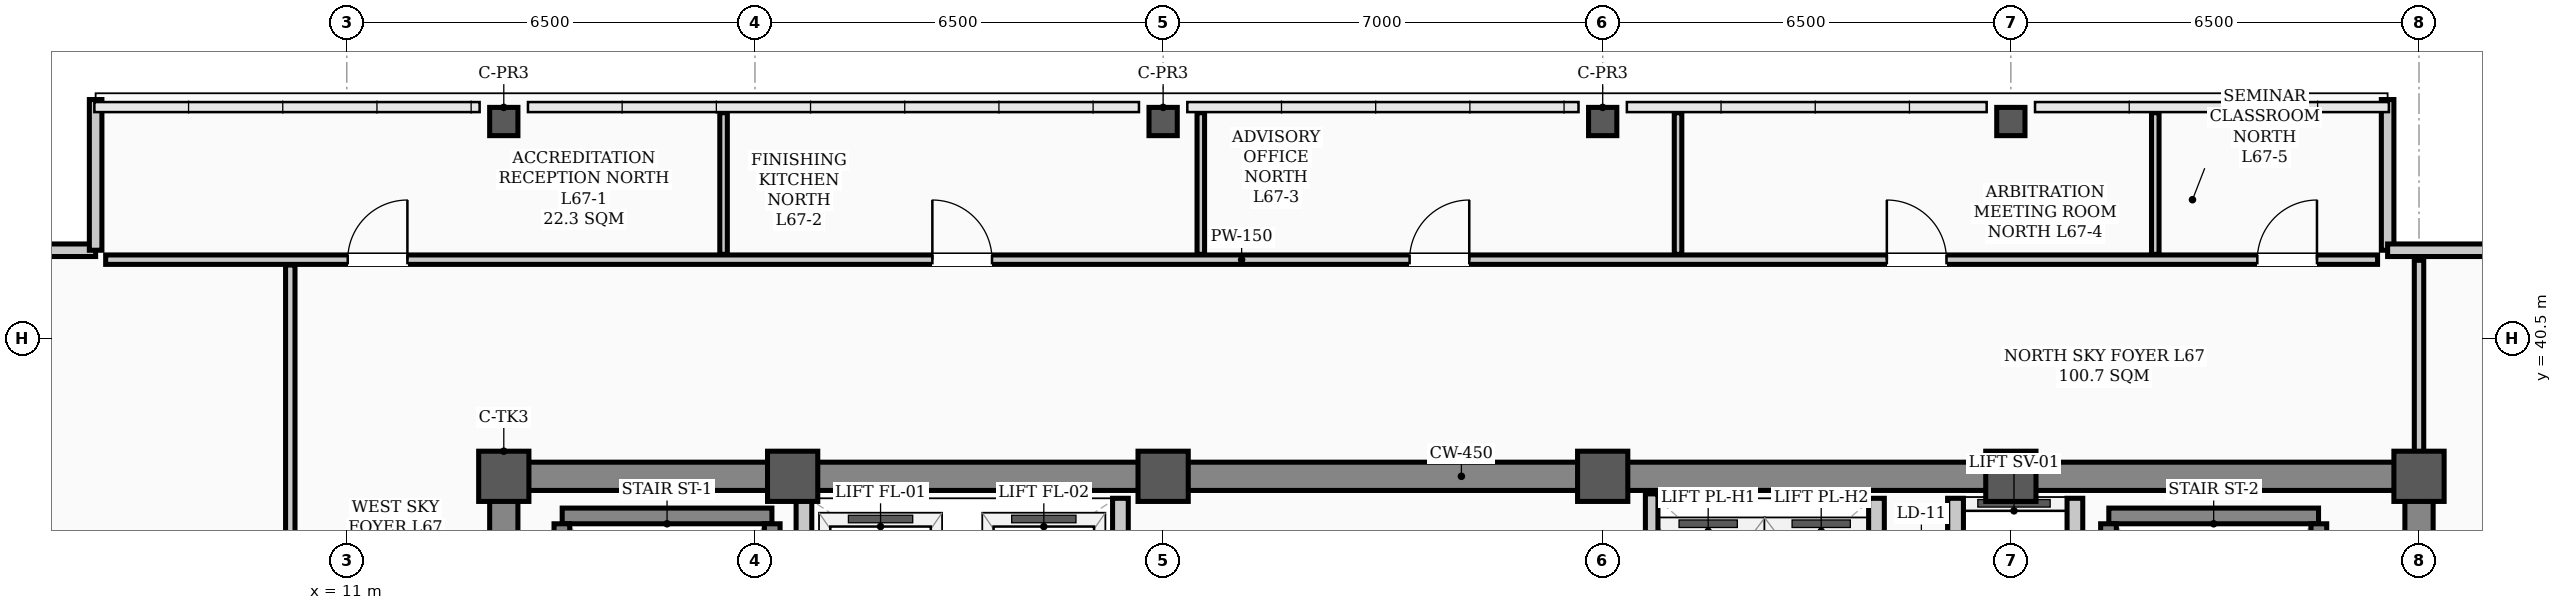
"""IFC4 building model, lengths in metres.
Left out: names, types, materials, properties, quantities, classifications, styles, units other than length and angle.
Written with IfcOpenShell. Run it as: python <this file> out.ifc"""

import sys

from ifc_helpers import new_model, si_unit, direction, frame, frame_2d, origin, origin_2d, place, context, subcontext, project, spatial, rectangle, hollow_rectangle, extrude, element, fill, save


model = new_model("IFC4")
c1 = context("Model", 3, precision=1e-05, world=origin(), true_north=direction((0.0, 1.0)))
c2 = subcontext(c1, "Body", "Model", "MODEL_VIEW")
j1 = project(units=[si_unit("LENGTHUNIT", "METRE"), si_unit("PLANEANGLEUNIT", "RADIAN")], contexts=[c1])
p1 = place(None, origin())
s1 = spatial("IfcSite", under=j1, at=p1, CompositionType="ELEMENT")
p2 = place(p1, origin())
s2 = spatial("IfcBuilding", under=s1, at=p2, CompositionType="ELEMENT")
p3 = place(p2, frame((0.0, 0.0, 269.6)))
s3 = spatial("IfcBuildingStorey", under=s2, at=p3, CompositionType="ELEMENT", Elevation=269.6)
for number, where, z_axis, x_axis in (
    (1, (13.5, 38.3, 0.0), (0.0, 0.0, 1.0), (1.0, 0.0, 0.0)),
    (2, (18.1, 38.3, 0.0), (0.0, 0.0, 1.0), (1.0, 0.0, 0.0)),
    (3, (24.0, 38.3, 0.0), (0.0, 0.0, 1.0), (1.0, 0.0, 0.0)),
    (4, (31.0, 38.3, 0.0), (0.0, 0.0, 1.0), (1.0, 0.0, 0.0)),
    (5, (37.5, 38.3, 0.0), (0.0, 0.0, 1.0), (1.0, 0.0, 0.0)),
    (6, (44.0, 38.3, 0.0), (0.0, 0.0, 1.0), (1.0, 0.0, 0.0)),
):
    element("IfcColumn", number, at=place(p3, frame(where, z_axis=z_axis, x_axis=x_axis)), inside=s3, PredefinedType="COLUMN", context=c2, shape_type="SweptSolid", body=[
        extrude(hollow_rectangle(XDim=0.8, YDim=0.8, WallThickness=0.032, InnerFilletRadius=0.016, OuterFilletRadius=0.048, at=origin_2d()), origin(), (0.0, 0.0, 1.0), 3.9),
    ])
for number, where, z_axis, x_axis in (
    (7, (13.5, 43.95, 0.0), (0.0, 0.0, 1.0), (1.0, 0.0, 0.0)),
    (8, (24.0, 43.95, 0.0), (0.0, 0.0, 1.0), (1.0, 0.0, 0.0)),
    (9, (31.0, 43.95, 0.0), (0.0, 0.0, 1.0), (1.0, 0.0, 0.0)),
    (10, (37.5, 43.95, 0.0), (0.0, 0.0, 1.0), (1.0, 0.0, 0.0)),
):
    element("IfcColumn", number, at=place(p3, frame(where, z_axis=z_axis, x_axis=x_axis)), inside=s3, PredefinedType="COLUMN", context=c2, shape_type="SweptSolid", body=[
        extrude(hollow_rectangle(XDim=0.45, YDim=0.45, WallThickness=0.022, InnerFilletRadius=0.022, OuterFilletRadius=0.044, at=origin_2d()), origin(), (0.0, 0.0, 1.0), 3.9),
    ])
p4 = place(p3, frame((4.6, 41.9, 0.0), z_axis=(0.0, 0.0, 1.0), x_axis=(1.0, 0.0, 0.0)))
e11 = element("IfcWall", 11, at=p4, inside=s3, PredefinedType="PARAPET", context=c2, shape_type="SweptSolid", body=[
    extrude(rectangle(XDim=2.4, YDim=0.2, at=frame_2d((1.2, 0.0))), origin(), (0.0, 0.0, 1.0), 1.2),
])
for number, where, z_axis, x_axis in (
    (12, (7.0, 41.9, 0.0), (0.0, 0.0, 1.0), (0.0, 1.0, 0.0)),
    (13, (43.5, 44.3, 0.0), (0.0, 0.0, 1.0), (0.0, -1.0, 0.0)),
):
    element("IfcWall", number, at=place(p3, frame(where, z_axis=z_axis, x_axis=x_axis)), inside=s3, PredefinedType="PARAPET", context=c2, shape_type="SweptSolid", body=[
        extrude(rectangle(XDim=2.4, YDim=0.2, at=frame_2d((1.2, 0.0))), origin(), (0.0, 0.0, 1.0), 1.2),
    ])
p5 = place(p3, frame((43.5, 41.9, 0.0), z_axis=(0.0, 0.0, 1.0), x_axis=(1.0, 0.0, 0.0)))
e14 = element("IfcWall", 14, at=p5, inside=s3, PredefinedType="PARAPET", context=c2, shape_type="SweptSolid", body=[
    extrude(rectangle(XDim=2.4, YDim=0.2, at=frame_2d((1.2, 0.0))), origin(), (0.0, 0.0, 1.0), 1.2),
])
p6 = place(p3, frame((13.5, 38.3, 0.0), z_axis=(0.0, 0.0, 1.0), x_axis=(1.0, 0.0, 0.0)))
e15 = element("IfcWall", 15, at=p6, inside=s3, PredefinedType="SHEAR", context=c2, shape_type="SweptSolid", body=[
    extrude(rectangle(XDim=30.5, YDim=0.45, at=frame_2d((15.25, 0.0))), origin(), (0.0, 0.0, 1.0), 3.72),
])
for number, where, z_axis, x_axis in (
    (16, (13.5, 29.35, 0.0), (0.0, 0.0, 1.0), (0.0, 1.0, 0.0)),
    (17, (44.0, 29.35, 0.0), (0.0, 0.0, 1.0), (0.0, 1.0, 0.0)),
):
    element("IfcWall", number, at=place(p3, frame(where, z_axis=z_axis, x_axis=x_axis)), inside=s3, PredefinedType="SHEAR", context=c2, shape_type="SweptSolid", body=[
        extrude(rectangle(XDim=8.6, YDim=0.45, at=frame_2d((4.3, 0.0))), origin(), (0.0, 0.0, 1.0), 3.72),
    ])
p7 = place(p3, frame((14.43, 37.669, 0.0), z_axis=(0.0, 0.0, 1.0), x_axis=(1.0, 0.0, 0.0)))
e18 = element("IfcWall", 18, at=p7, inside=s3, PredefinedType="STANDARD", context=c2, shape_type="SweptSolid", body=[
    extrude(rectangle(XDim=3.34, YDim=0.25, at=frame_2d((1.67, 0.0))), origin(), (0.0, 0.0, 1.0), 3.72),
])
for number, where, z_axis, x_axis in (
    (19, (14.425, 30.36, 0.0), (0.0, 0.0, 1.0), (0.0, 1.0, 0.0)),
    (20, (17.775, 30.36, 0.0), (0.0, 0.0, 1.0), (0.0, 1.0, 0.0)),
):
    element("IfcWall", number, at=place(p3, frame(where, z_axis=z_axis, x_axis=x_axis)), inside=s3, PredefinedType="STANDARD", context=c2, shape_type="SweptSolid", body=[
        extrude(rectangle(XDim=7.184, YDim=0.25, at=frame_2d((3.592, 0.0))), origin(), (0.0, 0.0, 1.0), 3.72),
    ])
p8 = place(p3, frame((39.06, 37.669, 0.0), z_axis=(0.0, 0.0, 1.0), x_axis=(1.0, 0.0, 0.0)))
e21 = element("IfcWall", 21, at=p8, inside=s3, PredefinedType="STANDARD", context=c2, shape_type="SweptSolid", body=[
    extrude(rectangle(XDim=3.34, YDim=0.25, at=frame_2d((1.67, 0.0))), origin(), (0.0, 0.0, 1.0), 3.72),
])
for number, where, z_axis, x_axis in (
    (22, (39.055, 30.36, 0.0), (0.0, 0.0, 1.0), (0.0, 1.0, 0.0)),
    (23, (42.405, 30.36, 0.0), (0.0, 0.0, 1.0), (0.0, 1.0, 0.0)),
):
    element("IfcWall", number, at=place(p3, frame(where, z_axis=z_axis, x_axis=x_axis)), inside=s3, PredefinedType="STANDARD", context=c2, shape_type="SweptSolid", body=[
        extrude(rectangle(XDim=7.184, YDim=0.25, at=frame_2d((3.592, 0.0))), origin(), (0.0, 0.0, 1.0), 3.72),
    ])
p9 = place(p3, frame((36.62, 31.95, 0.0), z_axis=(0.0, 0.0, 1.0), x_axis=(0.0, 1.0, 0.0)))
e24 = element("IfcWall", 24, at=p9, inside=s3, PredefinedType="STANDARD", context=c2, shape_type="SweptSolid", body=[
    extrude(rectangle(XDim=6.0, YDim=0.25, at=frame_2d((3.0, 0.0))), origin(), (0.0, 0.0, 1.0), 3.4),
])
p10 = place(p9, frame((0.9, 0.0, 0.0)))
e25 = element("IfcOpeningElement", 25, at=p10, cuts=e24, PredefinedType="OPENING", context=c2, shape_type="SweptSolid", body=[
    extrude(rectangle(XDim=1.1, YDim=2.08, at=frame_2d((0.55, 1.04))), frame((0.0, 0.135, 0.0), z_axis=(0.0, -1.0, 0.0), x_axis=(1.0, 0.0, 0.0)), (0.0, 0.0, 1.0), 0.27),
])
p11 = place(p9, frame((4.0, 0.0, 0.0)))
e26 = element("IfcOpeningElement", 26, at=p11, cuts=e24, PredefinedType="OPENING", context=c2, shape_type="SweptSolid", body=[
    extrude(rectangle(XDim=1.1, YDim=2.08, at=frame_2d((0.55, 1.04))), frame((0.0, 0.135, 0.0), z_axis=(0.0, -1.0, 0.0), x_axis=(1.0, 0.0, 0.0)), (0.0, 0.0, 1.0), 0.27),
])
p12 = place(p3, frame((38.52, 31.95, 0.0), z_axis=(0.0, 0.0, 1.0), x_axis=(0.0, 1.0, 0.0)))
e27 = element("IfcWall", 27, at=p12, inside=s3, PredefinedType="STANDARD", context=c2, shape_type="SweptSolid", body=[
    extrude(rectangle(XDim=6.0, YDim=0.25, at=frame_2d((3.0, 0.0))), origin(), (0.0, 0.0, 1.0), 3.48),
])
for number, where, z_axis, x_axis in (
    (28, (18.28, 34.62, 0.0), (0.0, 0.0, 1.0), (0.0, 1.0, 0.0)),
    (29, (23.32, 34.62, 0.0), (0.0, 0.0, 1.0), (0.0, 1.0, 0.0)),
):
    element("IfcWall", number, at=place(p3, frame(where, z_axis=z_axis, x_axis=x_axis)), inside=s3, PredefinedType="STANDARD", context=c2, shape_type="SweptSolid", body=[
        extrude(rectangle(XDim=3.33, YDim=0.25, at=frame_2d((1.665, 0.0))), origin(), (0.0, 0.0, 1.0), 3.4),
    ])
p13 = place(p3, frame((35.36, 34.9, 0.0), z_axis=(0.0, 0.0, 1.0), x_axis=(0.0, 1.0, 0.0)))
e30 = element("IfcWall", 30, at=p13, inside=s3, PredefinedType="STANDARD", context=c2, shape_type="SweptSolid", body=[
    extrude(rectangle(XDim=3.05, YDim=0.25, at=frame_2d((1.525, 0.0))), origin(), (0.0, 0.0, 1.0), 3.4),
])
p14 = place(p3, frame((7.16, 41.75, 0.0), z_axis=(0.0, 0.0, 1.0), x_axis=(1.0, 0.0, 0.0)))
e31 = element("IfcWall", 31, at=p14, inside=s3, PredefinedType="PARTITIONING", context=c2, shape_type="SweptSolid", body=[
    extrude(rectangle(XDim=36.18, YDim=0.15, at=frame_2d((18.09, 0.0))), origin(), (0.0, 0.0, 1.0), 3.2),
])
p15 = place(p14, frame((3.855, 0.0, 0.0)))
e32 = element("IfcOpeningElement", 32, at=p15, cuts=e31, PredefinedType="OPENING", context=c2, shape_type="SweptSolid", body=[
    extrude(rectangle(XDim=0.95, YDim=2.08, at=frame_2d((0.475, 1.04))), frame((0.0, 0.085, 0.0), z_axis=(0.0, -1.0, 0.0), x_axis=(1.0, 0.0, 0.0)), (0.0, 0.0, 1.0), 0.17),
])
p16 = place(p14, frame((13.165, 0.0, 0.0)))
e33 = element("IfcOpeningElement", 33, at=p16, cuts=e31, PredefinedType="OPENING", context=c2, shape_type="SweptSolid", body=[
    extrude(rectangle(XDim=0.95, YDim=2.08, at=frame_2d((0.475, 1.04))), frame((0.0, 0.085, 0.0), z_axis=(0.0, -1.0, 0.0), x_axis=(1.0, 0.0, 0.0)), (0.0, 0.0, 1.0), 0.17),
])
p17 = place(p14, frame((20.765, 0.0, 0.0)))
e34 = element("IfcOpeningElement", 34, at=p17, cuts=e31, PredefinedType="OPENING", context=c2, shape_type="SweptSolid", body=[
    extrude(rectangle(XDim=0.95, YDim=2.08, at=frame_2d((0.475, 1.04))), frame((0.0, 0.085, 0.0), z_axis=(0.0, -1.0, 0.0), x_axis=(1.0, 0.0, 0.0)), (0.0, 0.0, 1.0), 0.17),
])
p18 = place(p14, frame((28.365, 0.0, 0.0)))
e35 = element("IfcOpeningElement", 35, at=p18, cuts=e31, PredefinedType="OPENING", context=c2, shape_type="SweptSolid", body=[
    extrude(rectangle(XDim=0.95, YDim=2.08, at=frame_2d((0.475, 1.04))), frame((0.0, 0.085, 0.0), z_axis=(0.0, -1.0, 0.0), x_axis=(1.0, 0.0, 0.0)), (0.0, 0.0, 1.0), 0.17),
])
p19 = place(p14, frame((34.265, 0.0, 0.0)))
e36 = element("IfcOpeningElement", 36, at=p19, cuts=e31, PredefinedType="OPENING", context=c2, shape_type="SweptSolid", body=[
    extrude(rectangle(XDim=0.95, YDim=2.08, at=frame_2d((0.475, 1.04))), frame((0.0, 0.085, 0.0), z_axis=(0.0, -1.0, 0.0), x_axis=(1.0, 0.0, 0.0)), (0.0, 0.0, 1.0), 0.17),
])
p20 = place(p3, frame((10.1, 23.785, 0.0), z_axis=(0.0, 0.0, 1.0), x_axis=(0.0, 1.0, 0.0)))
e37 = element("IfcWall", 37, at=p20, inside=s3, PredefinedType="PARTITIONING", context=c2, shape_type="SweptSolid", body=[
    extrude(rectangle(XDim=17.88, YDim=0.15, at=frame_2d((8.94, 0.0))), origin(), (0.0, 0.0, 1.0), 3.1),
])
p21 = place(p20, frame((8.465, 0.0, 0.0)))
e38 = element("IfcOpeningElement", 38, at=p21, cuts=e37, PredefinedType="OPENING", context=c2, shape_type="SweptSolid", body=[
    extrude(rectangle(XDim=0.95, YDim=2.08, at=frame_2d((0.475, 1.04))), frame((0.0, 0.085, 0.0), z_axis=(0.0, -1.0, 0.0), x_axis=(1.0, 0.0, 0.0)), (0.0, 0.0, 1.0), 0.17),
])
p22 = place(p3, frame((44.0, 38.535, 0.0), z_axis=(0.0, 0.0, 1.0), x_axis=(0.0, 1.0, 0.0)))
e39 = element("IfcWall", 39, at=p22, inside=s3, PredefinedType="PARTITIONING", context=c2, shape_type="SweptSolid", body=[
    extrude(rectangle(XDim=3.205, YDim=0.15, at=frame_2d((1.603, 0.0))), origin(), (0.0, 0.0, 1.0), 3.72),
])
p23 = place(p3, frame((17.0, 41.835, 0.0), z_axis=(0.0, 0.0, 1.0), x_axis=(0.0, 1.0, 0.0)))
e40 = element("IfcWall", 40, at=p23, inside=s3, PredefinedType="PARTITIONING", context=c2, shape_type="SweptSolid", body=[
    extrude(rectangle(XDim=2.255, YDim=0.12, at=frame_2d((1.127, 0.0))), origin(), (0.0, 0.0, 1.0), 3.212),
])
p24 = place(p3, frame((24.6, 41.835, 0.0), z_axis=(0.0, 0.0, 1.0), x_axis=(0.0, 1.0, 0.0)))
e41 = element("IfcWall", 41, at=p24, inside=s3, PredefinedType="PARTITIONING", context=c2, shape_type="SweptSolid", body=[
    extrude(rectangle(XDim=2.255, YDim=0.12, at=frame_2d((1.127, 0.0))), origin(), (0.0, 0.0, 1.0), 3.2),
])
p25 = place(p3, frame((32.2, 41.835, 0.0), z_axis=(0.0, 0.0, 1.0), x_axis=(0.0, 1.0, 0.0)))
e42 = element("IfcWall", 42, at=p25, inside=s3, PredefinedType="PARTITIONING", context=c2, shape_type="SweptSolid", body=[
    extrude(rectangle(XDim=2.255, YDim=0.12, at=frame_2d((1.127, 0.0))), origin(), (0.0, 0.0, 1.0), 3.212),
])
p26 = place(p3, frame((39.8, 41.835, 0.0), z_axis=(0.0, 0.0, 1.0), x_axis=(0.0, 1.0, 0.0)))
e43 = element("IfcWall", 43, at=p26, inside=s3, PredefinedType="PARTITIONING", context=c2, shape_type="SweptSolid", body=[
    extrude(rectangle(XDim=2.255, YDim=0.12, at=frame_2d((1.127, 0.0))), origin(), (0.0, 0.0, 1.0), 3.72),
])
p27 = place(p3, frame((31.78, 34.9, 0.0), z_axis=(0.0, 0.0, 1.0), x_axis=(0.0, 1.0, 0.0)))
e44 = element("IfcWall", 44, at=p27, inside=s3, PredefinedType="STANDARD", context=c2, shape_type="SweptSolid", body=[
    extrude(rectangle(XDim=3.12, YDim=0.2, at=frame_2d((1.56, 0.0))), origin(), (0.0, 0.0, 1.0), 3.4),
])
p28 = place(p15, origin())
e45 = element("IfcDoor", 45, at=p28, inside=s3, OperationType="SINGLE_SWING_RIGHT", PredefinedType="DOOR", context=c2, shape_type="SweptSolid", body=[
    extrude(rectangle(XDim=0.95, YDim=2.08, at=frame_2d((0.475, 1.04))), frame((0.0, 0.025, 0.0), z_axis=(0.0, -1.0, 0.0), x_axis=(1.0, 0.0, 0.0)), (0.0, 0.0, 1.0), 0.05),
])
fill(e32, e45)
p29 = place(p16, origin())
e46 = element("IfcDoor", 46, at=p29, inside=s3, OperationType="SINGLE_SWING_LEFT", PredefinedType="DOOR", context=c2, shape_type="SweptSolid", body=[
    extrude(rectangle(XDim=0.95, YDim=2.08, at=frame_2d((0.475, 1.04))), frame((0.0, 0.025, 0.0), z_axis=(0.0, -1.0, 0.0), x_axis=(1.0, 0.0, 0.0)), (0.0, 0.0, 1.0), 0.05),
])
fill(e33, e46)
p30 = place(p17, origin())
e47 = element("IfcDoor", 47, at=p30, inside=s3, OperationType="SINGLE_SWING_RIGHT", PredefinedType="DOOR", context=c2, shape_type="SweptSolid", body=[
    extrude(rectangle(XDim=0.95, YDim=2.08, at=frame_2d((0.475, 1.04))), frame((0.0, 0.025, 0.0), z_axis=(0.0, -1.0, 0.0), x_axis=(1.0, 0.0, 0.0)), (0.0, 0.0, 1.0), 0.05),
])
fill(e34, e47)
p31 = place(p18, origin())
e48 = element("IfcDoor", 48, at=p31, inside=s3, OperationType="SINGLE_SWING_LEFT", PredefinedType="DOOR", context=c2, shape_type="SweptSolid", body=[
    extrude(rectangle(XDim=0.95, YDim=2.08, at=frame_2d((0.475, 1.04))), frame((0.0, 0.025, 0.0), z_axis=(0.0, -1.0, 0.0), x_axis=(1.0, 0.0, 0.0)), (0.0, 0.0, 1.0), 0.05),
])
fill(e35, e48)
p32 = place(p19, origin())
e49 = element("IfcDoor", 49, at=p32, inside=s3, OperationType="SINGLE_SWING_RIGHT", PredefinedType="DOOR", context=c2, shape_type="SweptSolid", body=[
    extrude(rectangle(XDim=0.95, YDim=2.08, at=frame_2d((0.475, 1.04))), frame((0.0, 0.025, 0.0), z_axis=(0.0, -1.0, 0.0), x_axis=(1.0, 0.0, 0.0)), (0.0, 0.0, 1.0), 0.05),
])
fill(e36, e49)
save(model, sys.argv[1])
